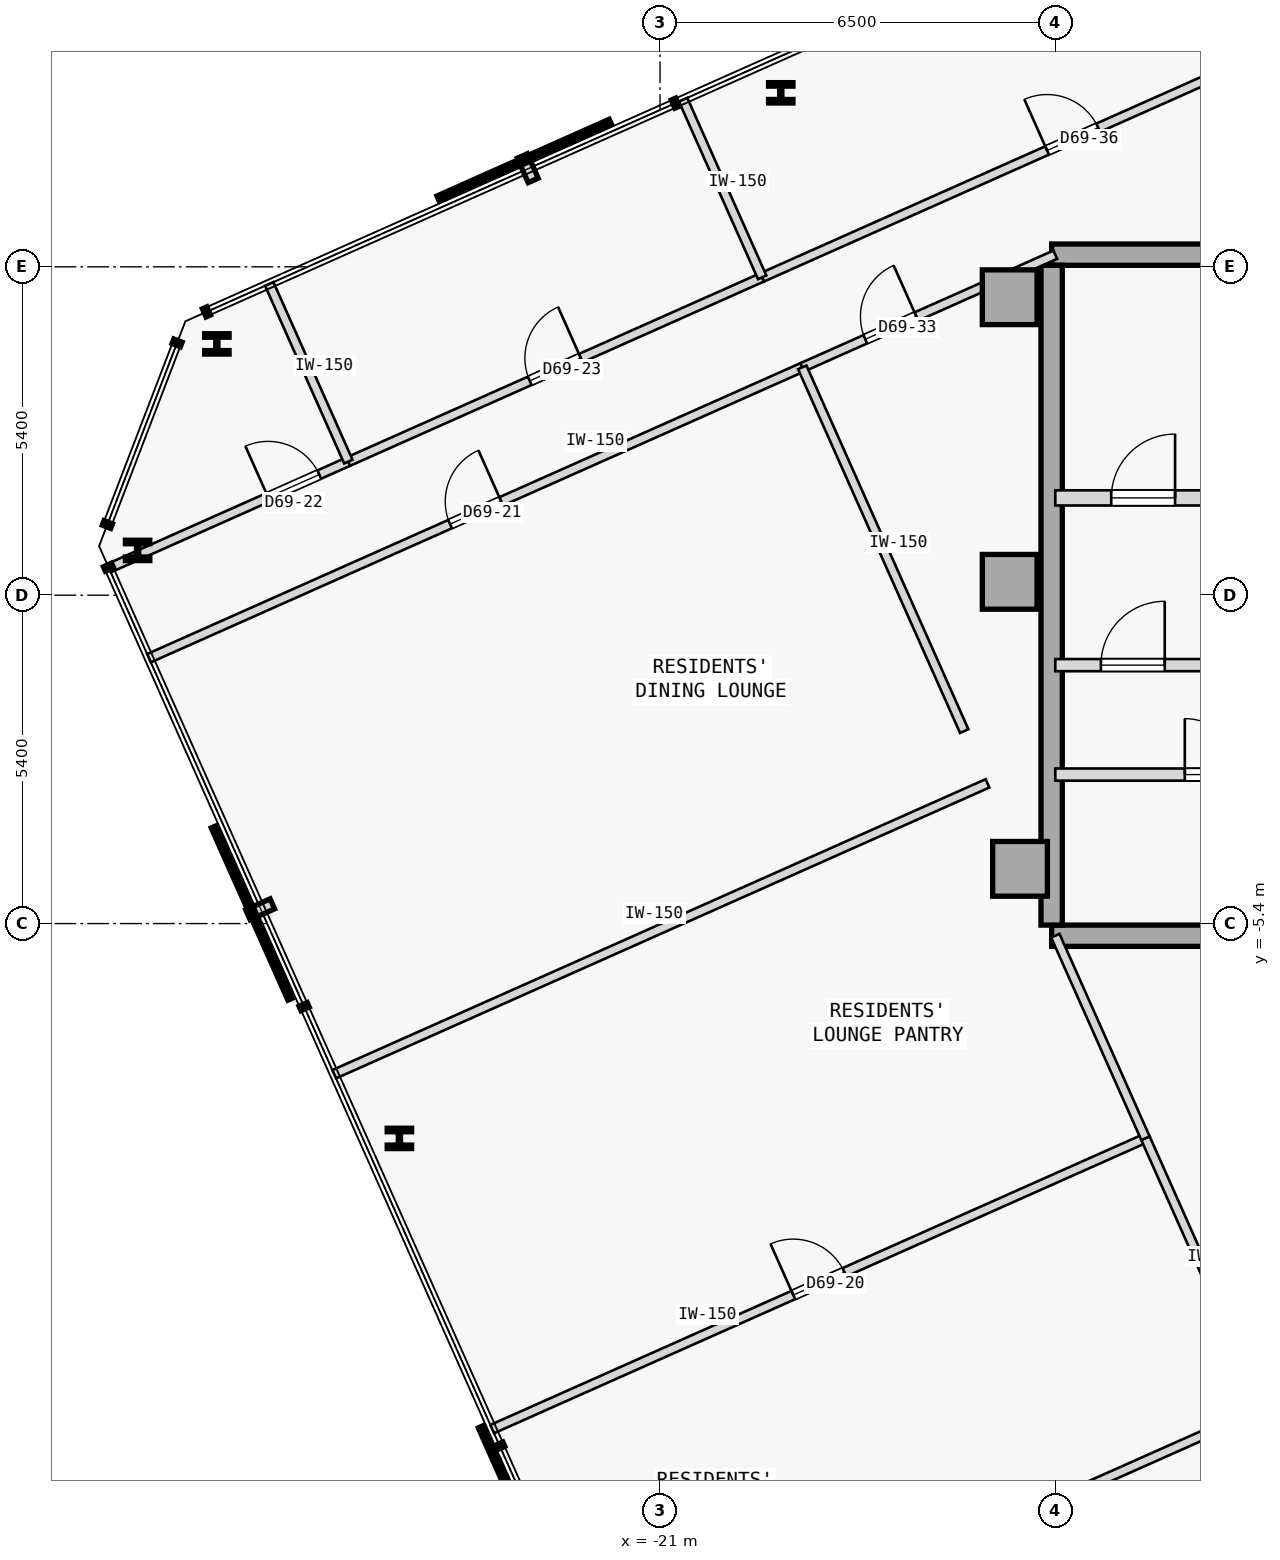
"""IFC4 building model, lengths in metres.
Left out: names, types, materials, properties, quantities, classifications, styles, units other than length and angle.
Written with IfcOpenShell. Run it as: python <this file> out.ifc"""

import sys

from ifc_helpers import new_model, si_unit, direction, frame, frame_2d, origin, origin_2d, place, context, subcontext, project, spatial, rectangle, i_section, extrude, element, fill, save


model = new_model("IFC4")
c1 = context("Model", 3, precision=1e-05, world=origin(), true_north=direction((0.0, 1.0)))
c2 = subcontext(c1, "Body", "Model", "MODEL_VIEW")
j1 = project(units=[si_unit("LENGTHUNIT", "METRE"), si_unit("PLANEANGLEUNIT", "RADIAN")], contexts=[c1])
p1 = place(None, origin())
s1 = spatial("IfcSite", under=j1, at=p1, CompositionType="ELEMENT")
p2 = place(p1, origin())
s2 = spatial("IfcBuilding", under=s1, at=p2, CompositionType="ELEMENT")
p3 = place(p2, frame((0.0, 0.0, 258.85)))
s3 = spatial("IfcBuildingStorey", under=s2, at=p3, CompositionType="ELEMENT", Elevation=258.85)
for number, where, z_axis, x_axis in (
    (1, (-15.25, 4.9, 0.0), (0.0, 0.0, 1.0), (1.0, 0.0, 0.0)),
    (2, (-15.25, 0.22, 0.0), (0.0, 0.0, 1.0), (1.0, 0.0, 0.0)),
    (3, (-15.08, -4.5, 0.0), (0.0, 0.0, 1.0), (1.0, 0.0, 0.0)),
):
    element("IfcColumn", number, at=place(p3, frame(where, z_axis=z_axis, x_axis=x_axis)), inside=s3, PredefinedType="COLUMN", context=c2, shape_type="SweptSolid", body=[
        extrude(rectangle(XDim=0.9, YDim=0.9, at=origin_2d()), origin(), (0.0, 0.0, 1.0), 3.35),
    ])
p4 = place(p3, frame((-14.56, 5.6, 0.0), z_axis=(0.0, 0.0, 1.0), x_axis=(1.0, 0.0, 0.0)))
e4 = element("IfcWall", 4, at=p4, inside=s3, PredefinedType="SHEAR", context=c2, shape_type="SweptSolid", body=[
    extrude(rectangle(XDim=11.41, YDim=0.35, at=frame_2d((5.705, 0.0))), origin(), (0.0, 0.0, 1.0), 3.125),
])
p5 = place(p3, frame((-14.56, -5.6, 0.0), z_axis=(0.0, 0.0, 1.0), x_axis=(1.0, 0.0, 0.0)))
e5 = element("IfcWall", 5, at=p5, inside=s3, PredefinedType="SHEAR", context=c2, shape_type="SweptSolid", body=[
    extrude(rectangle(XDim=10.86, YDim=0.35, at=frame_2d((5.43, 0.0))), origin(), (0.0, 0.0, 1.0), 3.125),
])
p6 = place(p3, frame((-14.56, -5.425, 0.0), z_axis=(0.0, 0.0, 1.0), x_axis=(0.0, 1.0, 0.0)))
e6 = element("IfcWall", 6, at=p6, inside=s3, PredefinedType="SHEAR", context=c2, shape_type="SweptSolid", body=[
    extrude(rectangle(XDim=10.85, YDim=0.35, at=frame_2d((5.425, 0.0))), origin(), (0.0, 0.0, 1.0), 3.125),
])
for number, where, z_axis, x_axis in (
    (7, (-19.015, 8.262, 0.0), (0.0, 0.0, 1.0), (1.0, 0.0, 0.0)),
    (8, (-28.288, 4.133, 0.0), (0.0, 0.0, 1.0), (1.0, 0.0, 0.0)),
    (9, (-29.592, 0.737, 0.0), (0.0, 0.0, 1.0), (1.0, 0.0, 0.0)),
    (10, (-25.286, -8.933, 0.0), (0.0, 0.0, 1.0), (1.0, 0.0, 0.0)),
):
    element("IfcColumn", number, at=place(p3, frame(where, z_axis=z_axis, x_axis=x_axis)), inside=s3, PredefinedType="COLUMN", context=c2, shape_type="SweptSolid", body=[
        extrude(i_section(OverallWidth=0.401, OverallDepth=0.335, WebThickness=0.036, FlangeThickness=0.058, FilletRadius=0.015, at=origin_2d()), origin(), (0.0, 0.0, 1.0), 3.35),
    ])
p7 = place(p3, frame((-14.5, 1.6, 0.0), z_axis=(0.0, 0.0, 1.0), x_axis=(1.0, 0.0, 0.0)))
e11 = element("IfcWall", 11, at=p7, inside=s3, PredefinedType="STANDARD", context=c2, shape_type="SweptSolid", body=[
    extrude(rectangle(XDim=3.6, YDim=0.25, at=frame_2d((1.8, 0.0))), origin(), (0.0, 0.0, 1.0), 3.125),
])
p8 = place(p7, frame((0.92, 0.0, 0.0)))
e12 = element("IfcOpeningElement", 12, at=p8, cuts=e11, PredefinedType="OPENING", context=c2, shape_type="SweptSolid", body=[
    extrude(rectangle(XDim=1.05, YDim=2.15, at=frame_2d((0.525, 1.075))), frame((0.0, 0.135, 0.0), z_axis=(0.0, -1.0, 0.0), x_axis=(1.0, 0.0, 0.0)), (0.0, 0.0, 1.0), 0.27),
])
p9 = place(p3, frame((-14.5, -1.15, 0.0), z_axis=(0.0, 0.0, 1.0), x_axis=(1.0, 0.0, 0.0)))
e13 = element("IfcWall", 13, at=p9, inside=s3, PredefinedType="STANDARD", context=c2, shape_type="SweptSolid", body=[
    extrude(rectangle(XDim=2.95, YDim=0.2, at=frame_2d((1.475, 0.0))), origin(), (0.0, 0.0, 1.0), 3.125),
])
p10 = place(p9, frame((0.75, 0.0, 0.0)))
e14 = element("IfcOpeningElement", 14, at=p10, cuts=e13, PredefinedType="OPENING", context=c2, shape_type="SweptSolid", body=[
    extrude(rectangle(XDim=1.05, YDim=2.18, at=frame_2d((0.525, 1.09))), frame((0.0, 0.11, 0.0), z_axis=(0.0, -1.0, 0.0), x_axis=(1.0, 0.0, 0.0)), (0.0, 0.0, 1.0), 0.22),
])
p11 = place(p3, frame((-14.5, -2.95, 0.0), z_axis=(0.0, 0.0, 1.0), x_axis=(1.0, 0.0, 0.0)))
e15 = element("IfcWall", 15, at=p11, inside=s3, PredefinedType="STANDARD", context=c2, shape_type="SweptSolid", body=[
    extrude(rectangle(XDim=10.8, YDim=0.2, at=frame_2d((5.4, 0.0))), origin(), (0.0, 0.0, 1.0), 3.125),
])
p12 = place(p11, frame((9.17, 0.0, 0.0)))
e16 = element("IfcOpeningElement", 16, at=p12, cuts=e15, PredefinedType="OPENING", context=c2, shape_type="SweptSolid", body=[
    extrude(rectangle(XDim=1.1, YDim=2.15, at=frame_2d((0.55, 1.075))), frame((0.0, 0.11, 0.0), z_axis=(0.0, -1.0, 0.0), x_axis=(1.0, 0.0, 0.0)), (0.0, 0.0, 1.0), 0.22),
])
p13 = place(p11, frame((2.13, 0.0, 0.0)))
e17 = element("IfcOpeningElement", 17, at=p13, cuts=e15, PredefinedType="OPENING", context=c2, shape_type="SweptSolid", body=[
    extrude(rectangle(XDim=0.92, YDim=2.15, at=frame_2d((0.46, 1.075))), frame((0.0, 0.11, 0.0), z_axis=(0.0, -1.0, 0.0), x_axis=(1.0, 0.0, 0.0)), (0.0, 0.0, 1.0), 0.22),
])
p14 = place(p11, frame((6.45, 0.0, 0.0)))
e18 = element("IfcOpeningElement", 18, at=p14, cuts=e15, PredefinedType="OPENING", context=c2, shape_type="SweptSolid", body=[
    extrude(rectangle(XDim=0.92, YDim=2.15, at=frame_2d((0.46, 1.075))), frame((0.0, 0.11, 0.0), z_axis=(0.0, -1.0, 0.0), x_axis=(1.0, 0.0, 0.0)), (0.0, 0.0, 1.0), 0.22),
])
p15 = place(p3, frame((-29.404, -1.036, 0.0), z_axis=(0.0, 0.0, 1.0), x_axis=(0.913544247064, 0.406739362069, 0.0)))
e19 = element("IfcWall", 19, at=p15, inside=s3, PredefinedType="PARTITIONING", context=c2, shape_type="SweptSolid", body=[
    extrude(rectangle(XDim=11.76, YDim=0.15, at=frame_2d((5.88, 0.0))), origin(), (0.0, 0.0, 1.0), 3.125),
])
p16 = place(p15, frame((5.42, 0.0, 0.0)))
e20 = element("IfcOpeningElement", 20, at=p16, cuts=e19, PredefinedType="OPENING", context=c2, shape_type="SweptSolid", body=[
    extrude(rectangle(XDim=0.92, YDim=2.15, at=frame_2d((0.46, 1.075))), frame((0.0, 0.085, 0.0), z_axis=(0.0, -1.0, 0.0), x_axis=(1.0, 0.0, 0.0)), (0.0, 0.0, 1.0), 0.17),
])
p17 = place(p3, frame((-30.063, 0.444, 0.0), z_axis=(0.0, 0.0, 1.0), x_axis=(0.91352868173, 0.406774320302, 0.0)))
e21 = element("IfcWall", 21, at=p17, inside=s3, PredefinedType="PARTITIONING", context=c2, shape_type="SweptSolid", body=[
    extrude(rectangle(XDim=4.31, YDim=0.15, at=frame_2d((2.155, 0.0))), origin(), (0.0, 0.0, 1.0), 3.125),
])
p18 = place(p17, frame((2.866, 0.0, 0.0)))
e22 = element("IfcOpeningElement", 22, at=p18, cuts=e21, PredefinedType="OPENING", context=c2, shape_type="SweptSolid", body=[
    extrude(rectangle(XDim=0.92, YDim=2.15, at=frame_2d((0.46, 1.075))), frame((0.0, 0.085, 0.0), z_axis=(0.0, -1.0, 0.0), x_axis=(1.0, 0.0, 0.0)), (0.0, 0.0, 1.0), 0.17),
])
p19 = place(p3, frame((-26.126, 2.197, 0.0), z_axis=(0.0, 0.0, 1.0), x_axis=(0.913553251328, 0.40671913772, 0.0)))
e23 = element("IfcWall", 23, at=p19, inside=s3, PredefinedType="PARTITIONING", context=c2, shape_type="SweptSolid", body=[
    extrude(rectangle(XDim=7.45, YDim=0.15, at=frame_2d((3.725, 0.0))), origin(), (0.0, 0.0, 1.0), 3.125),
])
p20 = place(p19, frame((3.265, 0.0, 0.0)))
e24 = element("IfcOpeningElement", 24, at=p20, cuts=e23, PredefinedType="OPENING", context=c2, shape_type="SweptSolid", body=[
    extrude(rectangle(XDim=0.92, YDim=2.15, at=frame_2d((0.46, 1.075))), frame((0.0, 0.085, 0.0), z_axis=(0.0, -1.0, 0.0), x_axis=(1.0, 0.0, 0.0)), (0.0, 0.0, 1.0), 0.17),
])
p21 = place(p3, frame((-18.661, 3.747, 0.0), z_axis=(0.0, 0.0, 1.0), x_axis=(0.913535055583, 0.40676000568, 0.0)))
e25 = element("IfcWall", 25, at=p21, inside=s3, PredefinedType="PARTITIONING", context=c2, shape_type="SweptSolid", body=[
    extrude(rectangle(XDim=4.555, YDim=0.15, at=frame_2d((2.277, 0.0))), origin(), (0.0, 0.0, 1.0), 3.125),
])
p22 = place(p21, frame((1.134, 0.0, 0.0)))
e26 = element("IfcOpeningElement", 26, at=p22, cuts=e25, PredefinedType="OPENING", context=c2, shape_type="SweptSolid", body=[
    extrude(rectangle(XDim=0.92, YDim=2.15, at=frame_2d((0.46, 1.075))), frame((0.0, 0.085, 0.0), z_axis=(0.0, -1.0, 0.0), x_axis=(1.0, 0.0, 0.0)), (0.0, 0.0, 1.0), 0.17),
])
p23 = place(p3, frame((-19.32, 5.227, 0.0), z_axis=(0.0, 0.0, 1.0), x_axis=(0.913543828741, 0.406740301628, 0.0)))
e27 = element("IfcWall", 27, at=p23, inside=s3, PredefinedType="PARTITIONING", context=c2, shape_type="SweptSolid", body=[
    extrude(rectangle(XDim=11.177, YDim=0.15, at=frame_2d((5.588, 0.0))), origin(), (0.0, 0.0, 1.0), 3.125),
])
p24 = place(p23, frame((5.128, 0.0, 0.0)))
e28 = element("IfcOpeningElement", 28, at=p24, cuts=e27, PredefinedType="OPENING", context=c2, shape_type="SweptSolid", body=[
    extrude(rectangle(XDim=0.92, YDim=2.15, at=frame_2d((0.46, 1.075))), frame((0.0, 0.085, 0.0), z_axis=(0.0, -1.0, 0.0), x_axis=(1.0, 0.0, 0.0)), (0.0, 0.0, 1.0), 0.17),
])
p25 = place(p3, frame((-21.789, -18.14, 0.0), z_axis=(0.0, 0.0, 1.0), x_axis=(0.913544247064, 0.406739362069, 0.0)))
e29 = element("IfcWall", 29, at=p25, inside=s3, PredefinedType="PARTITIONING", context=c2, shape_type="SweptSolid", body=[
    extrude(rectangle(XDim=11.76, YDim=0.15, at=frame_2d((5.88, 0.0))), origin(), (0.0, 0.0, 1.0), 3.125),
])
p26 = place(p25, frame((5.42, 0.0, 0.0)))
e30 = element("IfcOpeningElement", 30, at=p26, cuts=e29, PredefinedType="OPENING", context=c2, shape_type="SweptSolid", body=[
    extrude(rectangle(XDim=0.92, YDim=2.15, at=frame_2d((0.46, 1.075))), frame((0.0, 0.085, 0.0), z_axis=(0.0, -1.0, 0.0), x_axis=(1.0, 0.0, 0.0)), (0.0, 0.0, 1.0), 0.17),
])
p27 = place(p3, frame((-23.76, -13.713, 0.0), z_axis=(0.0, 0.0, 1.0), x_axis=(0.913544247064, 0.406739362069, 0.0)))
e31 = element("IfcWall", 31, at=p27, inside=s3, PredefinedType="PARTITIONING", context=c2, shape_type="SweptSolid", body=[
    extrude(rectangle(XDim=11.76, YDim=0.15, at=frame_2d((5.88, 0.0))), origin(), (0.0, 0.0, 1.0), 3.125),
])
p28 = place(p27, frame((5.42, 0.0, 0.0)))
e32 = element("IfcOpeningElement", 32, at=p28, cuts=e31, PredefinedType="OPENING", context=c2, shape_type="SweptSolid", body=[
    extrude(rectangle(XDim=0.92, YDim=2.15, at=frame_2d((0.46, 1.075))), frame((0.0, 0.085, 0.0), z_axis=(0.0, -1.0, 0.0), x_axis=(1.0, 0.0, 0.0)), (0.0, 0.0, 1.0), 0.17),
])
p29 = place(p3, frame((-11.429, -12.496, 0.0), z_axis=(0.0, 0.0, 1.0), x_axis=(-0.406782597231, 0.91352499615, 0.0)))
e33 = element("IfcWall", 33, at=p29, inside=s3, PredefinedType="PARTITIONING", context=c2, shape_type="SweptSolid", body=[
    extrude(rectangle(XDim=3.903, YDim=0.15, at=frame_2d((1.951, 0.0))), origin(), (0.0, 0.0, 1.0), 3.125),
])
p30 = place(p3, frame((-26.358, -7.878, 0.0), z_axis=(0.0, 0.0, 1.0), x_axis=(0.913547681516, 0.406731648137, 0.0)))
e34 = element("IfcWall", 34, at=p30, inside=s3, PredefinedType="PARTITIONING", context=c2, shape_type="SweptSolid", body=[
    extrude(rectangle(XDim=11.76, YDim=0.15, at=frame_2d((5.88, 0.0))), origin(), (0.0, 0.0, 1.0), 3.125),
])
p31 = place(p3, frame((-13.017, -8.93, 0.0), z_axis=(0.0, 0.0, 1.0), x_axis=(-0.406722395322, 0.913551801018, 0.0)))
e35 = element("IfcWall", 35, at=p31, inside=s3, PredefinedType="PARTITIONING", context=c2, shape_type="SweptSolid", body=[
    extrude(rectangle(XDim=3.646, YDim=0.15, at=frame_2d((1.823, 0.0))), origin(), (0.0, 0.0, 1.0), 3.125),
])
p32 = place(p3, frame((-15.998, -2.235, 0.0), z_axis=(0.0, 0.0, 1.0), x_axis=(-0.406736853191, 0.913545364093, 0.0)))
e36 = element("IfcWall", 36, at=p32, inside=s3, PredefinedType="PARTITIONING", context=c2, shape_type="SweptSolid", body=[
    extrude(rectangle(XDim=6.548, YDim=0.15, at=frame_2d((3.274, 0.0))), origin(), (0.0, 0.0, 1.0), 3.125),
])
for number, where, z_axis, x_axis in (
    (37, (-26.126, 2.197, 0.0), (0.0, 0.0, 1.0), (-0.407, 0.914, 0.0)),
    (38, (-19.32, 5.227, 0.0), (0.0, 0.0, 1.0), (-0.407, 0.914, 0.0)),
):
    element("IfcWall", number, at=place(p3, frame(where, z_axis=z_axis, x_axis=x_axis)), inside=s3, PredefinedType="PARTITIONING", context=c2, shape_type="SweptSolid", body=[
        extrude(rectangle(XDim=3.198, YDim=0.15, at=frame_2d((1.599, 0.0))), origin(), (0.0, 0.0, 1.0), 3.125),
    ])
p33 = place(p8, origin())
e39 = element("IfcDoor", 39, at=p33, inside=s3, OperationType="SINGLE_SWING_RIGHT", PredefinedType="DOOR", context=c2, shape_type="SweptSolid", body=[
    extrude(rectangle(XDim=1.05, YDim=2.15, at=frame_2d((0.525, 1.075))), frame((0.0, 0.025, 0.0), z_axis=(0.0, -1.0, 0.0), x_axis=(1.0, 0.0, 0.0)), (0.0, 0.0, 1.0), 0.05),
])
fill(e12, e39)
p34 = place(p10, origin())
e40 = element("IfcDoor", 40, at=p34, inside=s3, OperationType="SINGLE_SWING_RIGHT", PredefinedType="DOOR", context=c2, shape_type="SweptSolid", body=[
    extrude(rectangle(XDim=1.05, YDim=2.18, at=frame_2d((0.525, 1.09))), frame((0.0, 0.025, 0.0), z_axis=(0.0, -1.0, 0.0), x_axis=(1.0, 0.0, 0.0)), (0.0, 0.0, 1.0), 0.05),
])
fill(e14, e40)
p35 = place(p13, origin())
e41 = element("IfcDoor", 41, at=p35, inside=s3, OperationType="SINGLE_SWING_LEFT", PredefinedType="DOOR", context=c2, shape_type="SweptSolid", body=[
    extrude(rectangle(XDim=0.92, YDim=2.15, at=frame_2d((0.46, 1.075))), frame((0.0, 0.025, 0.0), z_axis=(0.0, -1.0, 0.0), x_axis=(1.0, 0.0, 0.0)), (0.0, 0.0, 1.0), 0.05),
])
fill(e17, e41)
p36 = place(p28, origin())
e42 = element("IfcDoor", 42, at=p36, inside=s3, OperationType="SINGLE_SWING_LEFT", PredefinedType="DOOR", context=c2, shape_type="SweptSolid", body=[
    extrude(rectangle(XDim=0.92, YDim=2.15, at=frame_2d((0.46, 1.075))), frame((0.0, 0.025, 0.0), z_axis=(0.0, -1.0, 0.0), x_axis=(1.0, 0.0, 0.0)), (0.0, 0.0, 1.0), 0.05),
])
fill(e32, e42)
p37 = place(p16, origin())
e43 = element("IfcDoor", 43, at=p37, inside=s3, OperationType="SINGLE_SWING_RIGHT", PredefinedType="DOOR", context=c2, shape_type="SweptSolid", body=[
    extrude(rectangle(XDim=0.92, YDim=2.15, at=frame_2d((0.46, 1.075))), frame((0.0, 0.025, 0.0), z_axis=(0.0, -1.0, 0.0), x_axis=(1.0, 0.0, 0.0)), (0.0, 0.0, 1.0), 0.05),
])
fill(e20, e43)
p38 = place(p18, origin())
e44 = element("IfcDoor", 44, at=p38, inside=s3, OperationType="SINGLE_SWING_LEFT", PredefinedType="DOOR", context=c2, shape_type="SweptSolid", body=[
    extrude(rectangle(XDim=0.92, YDim=2.15, at=frame_2d((0.46, 1.075))), frame((0.0, 0.025, 0.0), z_axis=(0.0, -1.0, 0.0), x_axis=(1.0, 0.0, 0.0)), (0.0, 0.0, 1.0), 0.05),
])
fill(e22, e44)
p39 = place(p20, origin())
e45 = element("IfcDoor", 45, at=p39, inside=s3, OperationType="SINGLE_SWING_RIGHT", PredefinedType="DOOR", context=c2, shape_type="SweptSolid", body=[
    extrude(rectangle(XDim=0.92, YDim=2.15, at=frame_2d((0.46, 1.075))), frame((0.0, 0.025, 0.0), z_axis=(0.0, -1.0, 0.0), x_axis=(1.0, 0.0, 0.0)), (0.0, 0.0, 1.0), 0.05),
])
fill(e24, e45)
p40 = place(p22, origin())
e46 = element("IfcDoor", 46, at=p40, inside=s3, OperationType="SINGLE_SWING_RIGHT", PredefinedType="DOOR", context=c2, shape_type="SweptSolid", body=[
    extrude(rectangle(XDim=0.92, YDim=2.15, at=frame_2d((0.46, 1.075))), frame((0.0, 0.025, 0.0), z_axis=(0.0, -1.0, 0.0), x_axis=(1.0, 0.0, 0.0)), (0.0, 0.0, 1.0), 0.05),
])
fill(e26, e46)
p41 = place(p24, origin())
e47 = element("IfcDoor", 47, at=p41, inside=s3, OperationType="SINGLE_SWING_LEFT", PredefinedType="DOOR", context=c2, shape_type="SweptSolid", body=[
    extrude(rectangle(XDim=0.92, YDim=2.15, at=frame_2d((0.46, 1.075))), frame((0.0, 0.025, 0.0), z_axis=(0.0, -1.0, 0.0), x_axis=(1.0, 0.0, 0.0)), (0.0, 0.0, 1.0), 0.05),
])
fill(e28, e47)
save(model, sys.argv[1])
